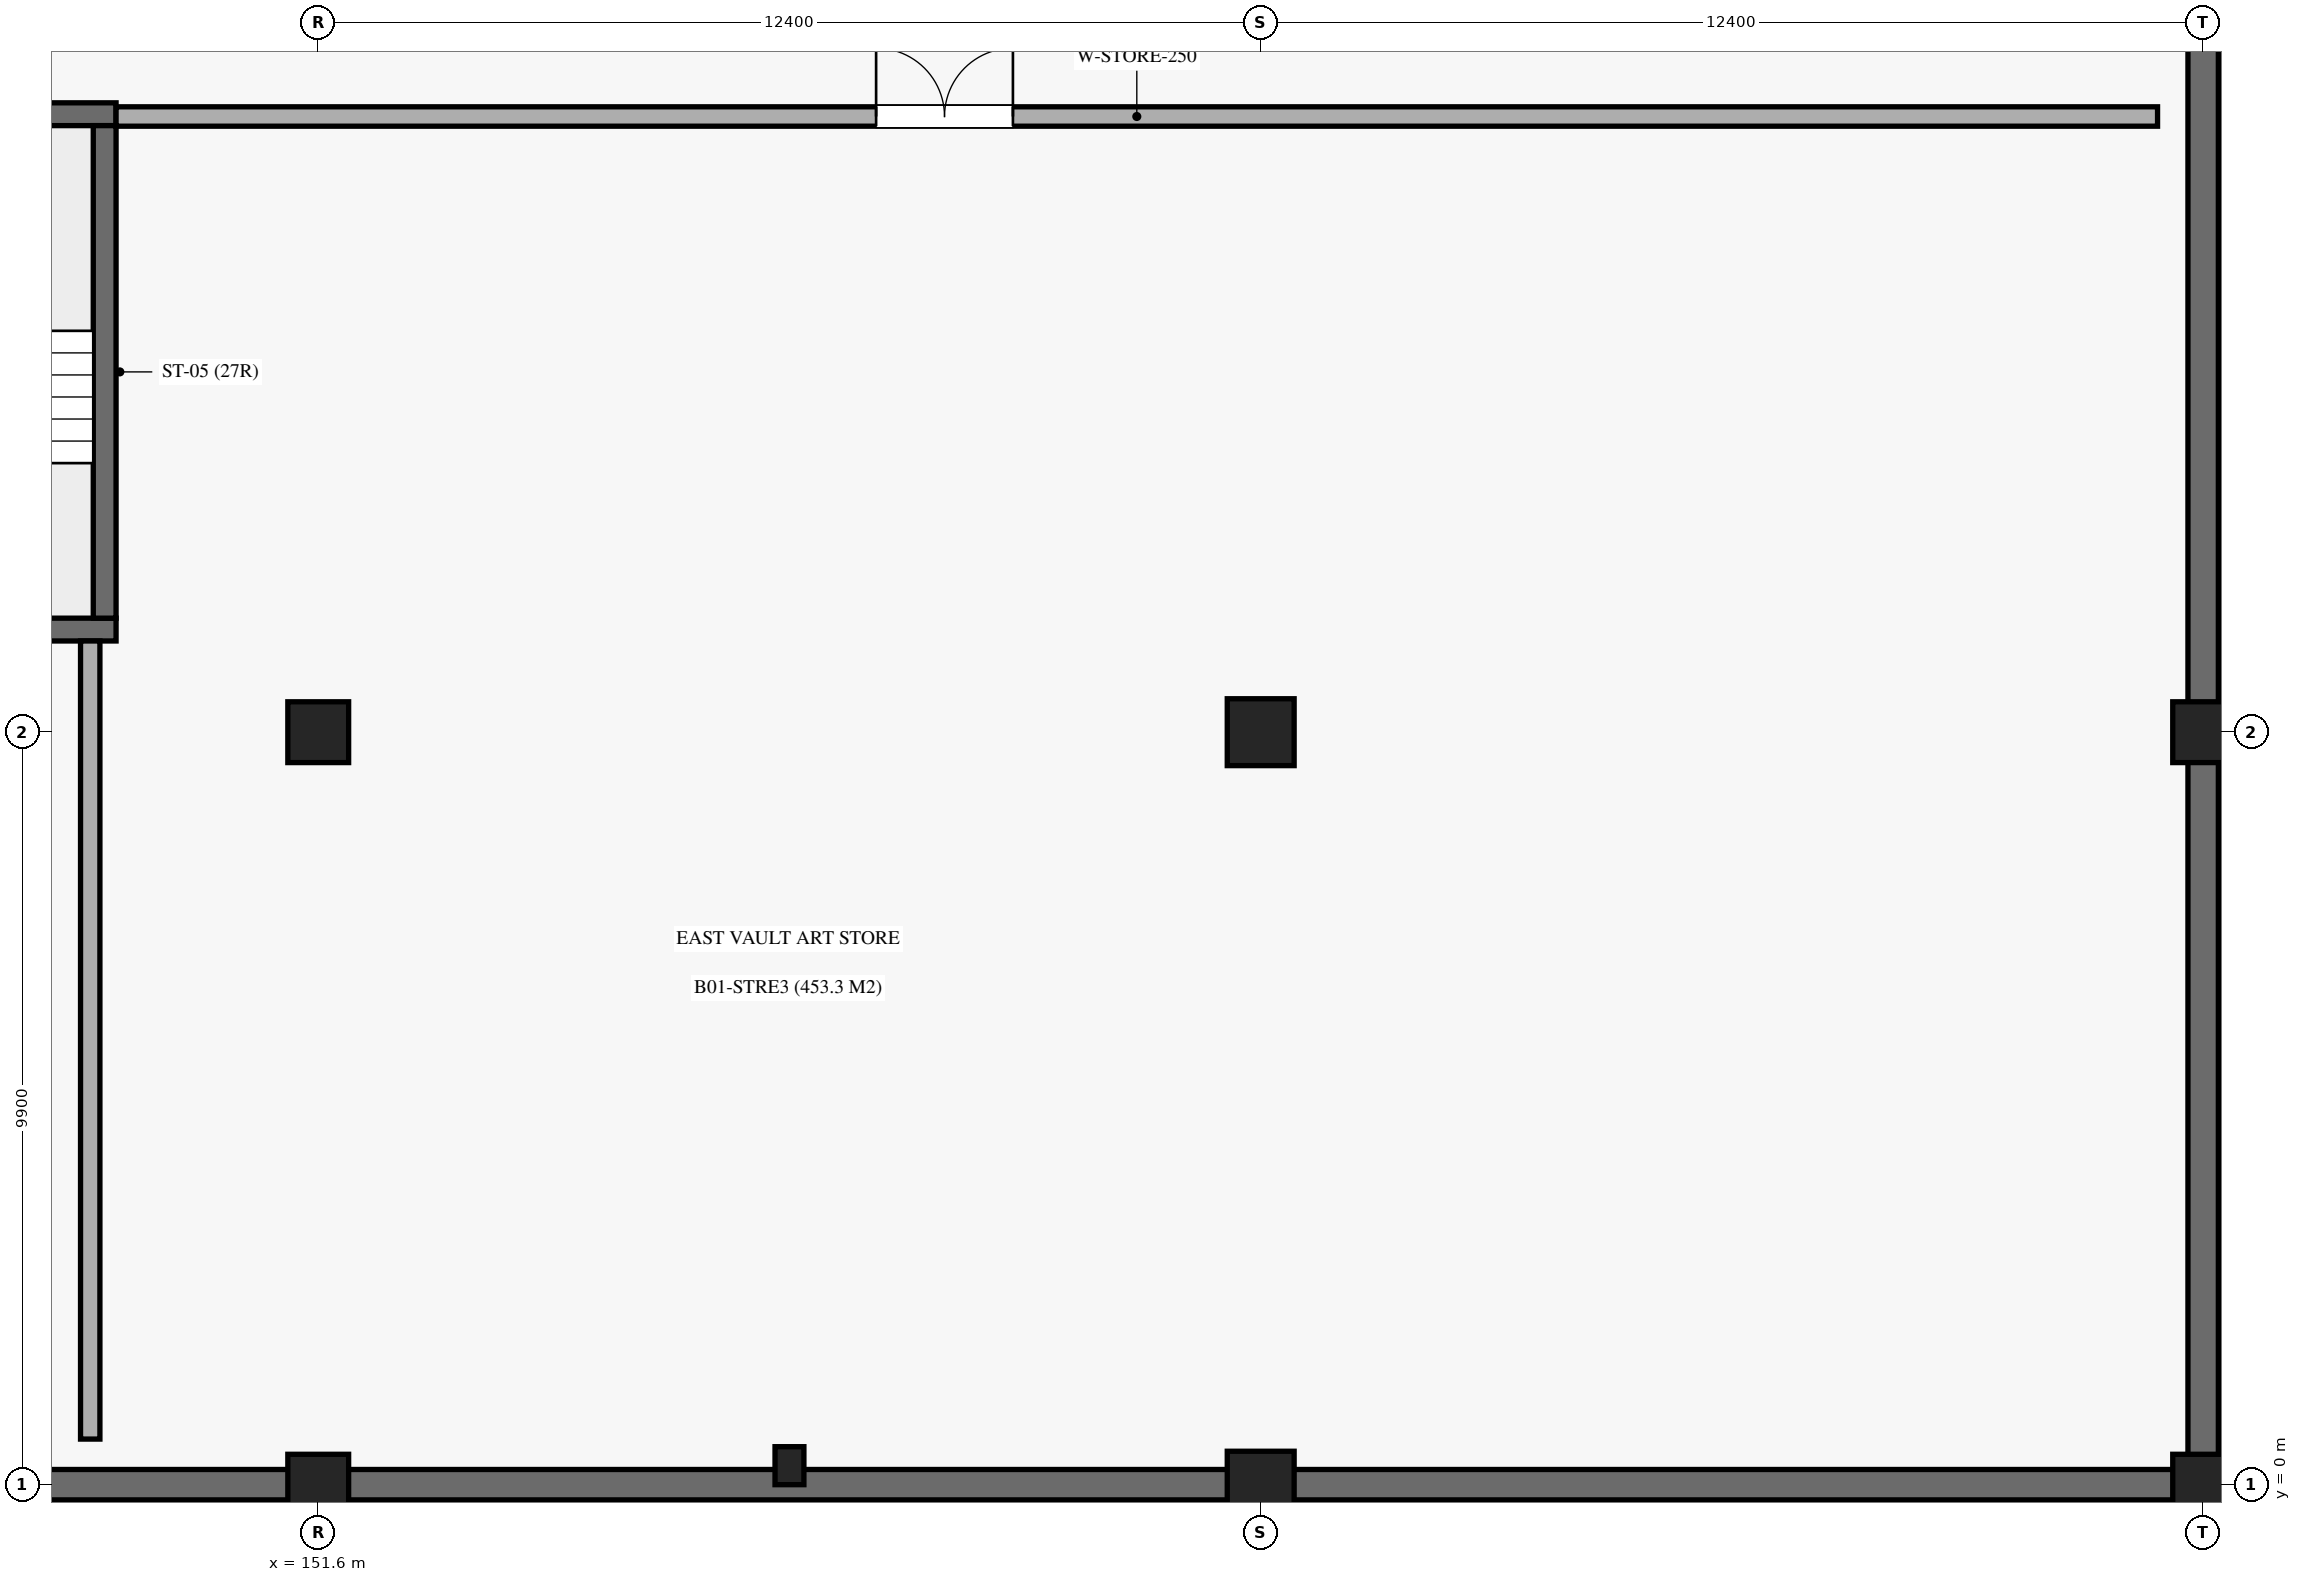
"""IFC4 building model, lengths in metres.
Left out: names, types, materials, properties, quantities, classifications, styles, units other than length and angle.
Written with IfcOpenShell. Run it as: python <this file> out.ifc"""

import sys

from ifc_helpers import new_model, si_unit, direction, frame, frame_2d, origin, origin_2d, place, context, subcontext, project, spatial, rectangle, circle, extrude, element, fill, save


model = new_model("IFC4")
c1 = context("Model", 3, precision=1e-05, world=origin(), true_north=direction((0.0, 1.0)))
c2 = subcontext(c1, "Body", "Model", "MODEL_VIEW")
j1 = project(units=[si_unit("LENGTHUNIT", "METRE"), si_unit("PLANEANGLEUNIT", "RADIAN")], contexts=[c1])
p1 = place(None, origin())
s1 = spatial("IfcSite", under=j1, at=p1, CompositionType="ELEMENT")
p2 = place(p1, origin())
s2 = spatial("IfcBuilding", under=s1, at=p2, CompositionType="ELEMENT")
p3 = place(p2, frame((0.0, 0.0, -4.59)))
s3 = spatial("IfcBuildingStorey", under=s2, at=p3, CompositionType="ELEMENT", Elevation=-4.59)
for number, where, z_axis, x_axis in (
    (1, (151.6, 0.0, 0.0), (0.0, 0.0, 1.0), (1.0, 0.0, 0.0)),
    (2, (151.6, 9.9, 0.0), (0.0, 0.0, 1.0), (1.0, 0.0, 0.0)),
):
    element("IfcColumn", number, at=place(p3, frame(where, z_axis=z_axis, x_axis=x_axis)), inside=s3, PredefinedType="COLUMN", context=c2, shape_type="SweptSolid", body=[
        extrude(rectangle(XDim=0.8, YDim=0.8, at=origin_2d()), origin(), (0.0, 0.0, 1.0), 4.59),
    ])
for number, where, z_axis, x_axis in (
    (3, (164.0, 0.0, 0.0), (0.0, 0.0, 1.0), (1.0, 0.0, 0.0)),
    (4, (164.0, 9.9, 0.0), (0.0, 0.0, 1.0), (1.0, 0.0, 0.0)),
):
    element("IfcColumn", number, at=place(p3, frame(where, z_axis=z_axis, x_axis=x_axis)), inside=s3, PredefinedType="COLUMN", context=c2, shape_type="SweptSolid", body=[
        extrude(circle(Radius=0.44, at=origin_2d()), origin(), (0.0, 0.0, 1.0), 4.59),
    ])
for number, where, z_axis, x_axis in (
    (5, (176.4, 0.0, 0.0), (0.0, 0.0, 1.0), (1.0, 0.0, 0.0)),
    (6, (176.4, 9.9, 0.0), (0.0, 0.0, 1.0), (1.0, 0.0, 0.0)),
):
    element("IfcColumn", number, at=place(p3, frame(where, z_axis=z_axis, x_axis=x_axis)), inside=s3, PredefinedType="COLUMN", context=c2, shape_type="SweptSolid", body=[
        extrude(rectangle(XDim=0.8, YDim=0.8, at=origin_2d()), origin(), (0.0, 0.0, 1.0), 4.59),
    ])
p4 = place(p3, frame((157.8, 0.25, 0.0), z_axis=(0.0, 0.0, 1.0), x_axis=(1.0, 0.0, 0.0)))
e7 = element("IfcColumn", 7, at=p4, inside=s3, PredefinedType="PILASTER", context=c2, shape_type="SweptSolid", body=[
    extrude(rectangle(XDim=0.38, YDim=0.5, at=origin_2d()), origin(), (0.0, 0.0, 1.0), 4.59),
])
p5 = place(p3, frame((62.0, 0.0, 0.0), z_axis=(0.0, 0.0, 1.0), x_axis=(1.0, 0.0, 0.0)))
e8 = element("IfcWall", 8, at=p5, inside=s3, PredefinedType="USERDEFINED", context=c2, shape_type="SweptSolid", body=[
    extrude(rectangle(XDim=114.4, YDim=0.4, at=frame_2d((57.2, 0.0))), origin(), (0.0, 0.0, 1.0), 3.64),
])
p6 = place(p3, frame((176.4, 0.0, 0.0), z_axis=(0.0, 0.0, 1.0), x_axis=(0.0, 1.0, 0.0)))
e9 = element("IfcWall", 9, at=p6, inside=s3, PredefinedType="USERDEFINED", context=c2, shape_type="SweptSolid", body=[
    extrude(rectangle(XDim=39.6, YDim=0.4, at=frame_2d((19.8, 0.0))), origin(), (0.0, 0.0, 1.0), 3.64),
])
for number, where, z_axis, x_axis in (
    (10, (141.86, 11.25, 0.0), (0.0, 0.0, 1.0), (1.0, 0.0, 0.0)),
    (11, (141.86, 18.03, 0.0), (0.0, 0.0, 1.0), (1.0, 0.0, 0.0)),
):
    element("IfcWall", number, at=place(p3, frame(where, z_axis=z_axis, x_axis=x_axis)), inside=s3, PredefinedType="SHEAR", context=c2, shape_type="SweptSolid", body=[
        extrude(rectangle(XDim=7.08, YDim=0.3, at=frame_2d((3.54, 0.0))), origin(), (0.0, 0.0, 1.0), 4.29),
    ])
p7 = place(p3, frame((148.79, 11.4, 0.0), z_axis=(0.0, 0.0, 1.0), x_axis=(0.0, 1.0, 0.0)))
e12 = element("IfcWall", 12, at=p7, inside=s3, PredefinedType="SHEAR", context=c2, shape_type="SweptSolid", body=[
    extrude(rectangle(XDim=6.48, YDim=0.3, at=frame_2d((3.24, 0.0))), origin(), (0.0, 0.0, 1.0), 4.29),
])
p8 = place(p3, frame((148.94, 18.0, 0.0), z_axis=(0.0, 0.0, 1.0), x_axis=(1.0, 0.0, 0.0)))
e13 = element("IfcWall", 13, at=p8, inside=s3, PredefinedType="SOLIDWALL", context=c2, shape_type="SweptSolid", body=[
    extrude(rectangle(XDim=26.86, YDim=0.255, at=frame_2d((13.43, 0.0))), origin(), (0.0, 0.0, 1.0), 3.41),
])
p9 = place(p8, frame((10.0, 0.0, 0.0)))
e14 = element("IfcOpeningElement", 14, at=p9, cuts=e13, PredefinedType="OPENING", context=c2, shape_type="SweptSolid", body=[
    extrude(rectangle(XDim=1.8, YDim=2.35, at=frame_2d((0.9, 1.175))), frame((0.0, 0.137, 0.0), z_axis=(0.0, -1.0, 0.0), x_axis=(1.0, 0.0, 0.0)), (0.0, 0.0, 1.0), 0.275),
])
p10 = place(p3, frame((148.6, 0.6, 0.0), z_axis=(0.0, 0.0, 1.0), x_axis=(0.0, 1.0, 0.0)))
e15 = element("IfcWall", 15, at=p10, inside=s3, PredefinedType="SOLIDWALL", context=c2, shape_type="SweptSolid", body=[
    extrude(rectangle(XDim=10.5, YDim=0.255, at=frame_2d((5.25, 0.0))), origin(), (0.0, 0.0, 1.0), 3.41),
])
p11 = place(p9, origin())
e16 = element("IfcDoor", 16, at=p11, inside=s3, OperationType="DOUBLE_DOOR_SINGLE_SWING", PredefinedType="DOOR", context=c2, shape_type="SweptSolid", body=[
    extrude(rectangle(XDim=1.8, YDim=2.35, at=frame_2d((0.9, 1.175))), frame((0.0, 0.025, 0.0), z_axis=(0.0, -1.0, 0.0), x_axis=(1.0, 0.0, 0.0)), (0.0, 0.0, 1.0), 0.05),
])
fill(e14, e16)
save(model, sys.argv[1])
